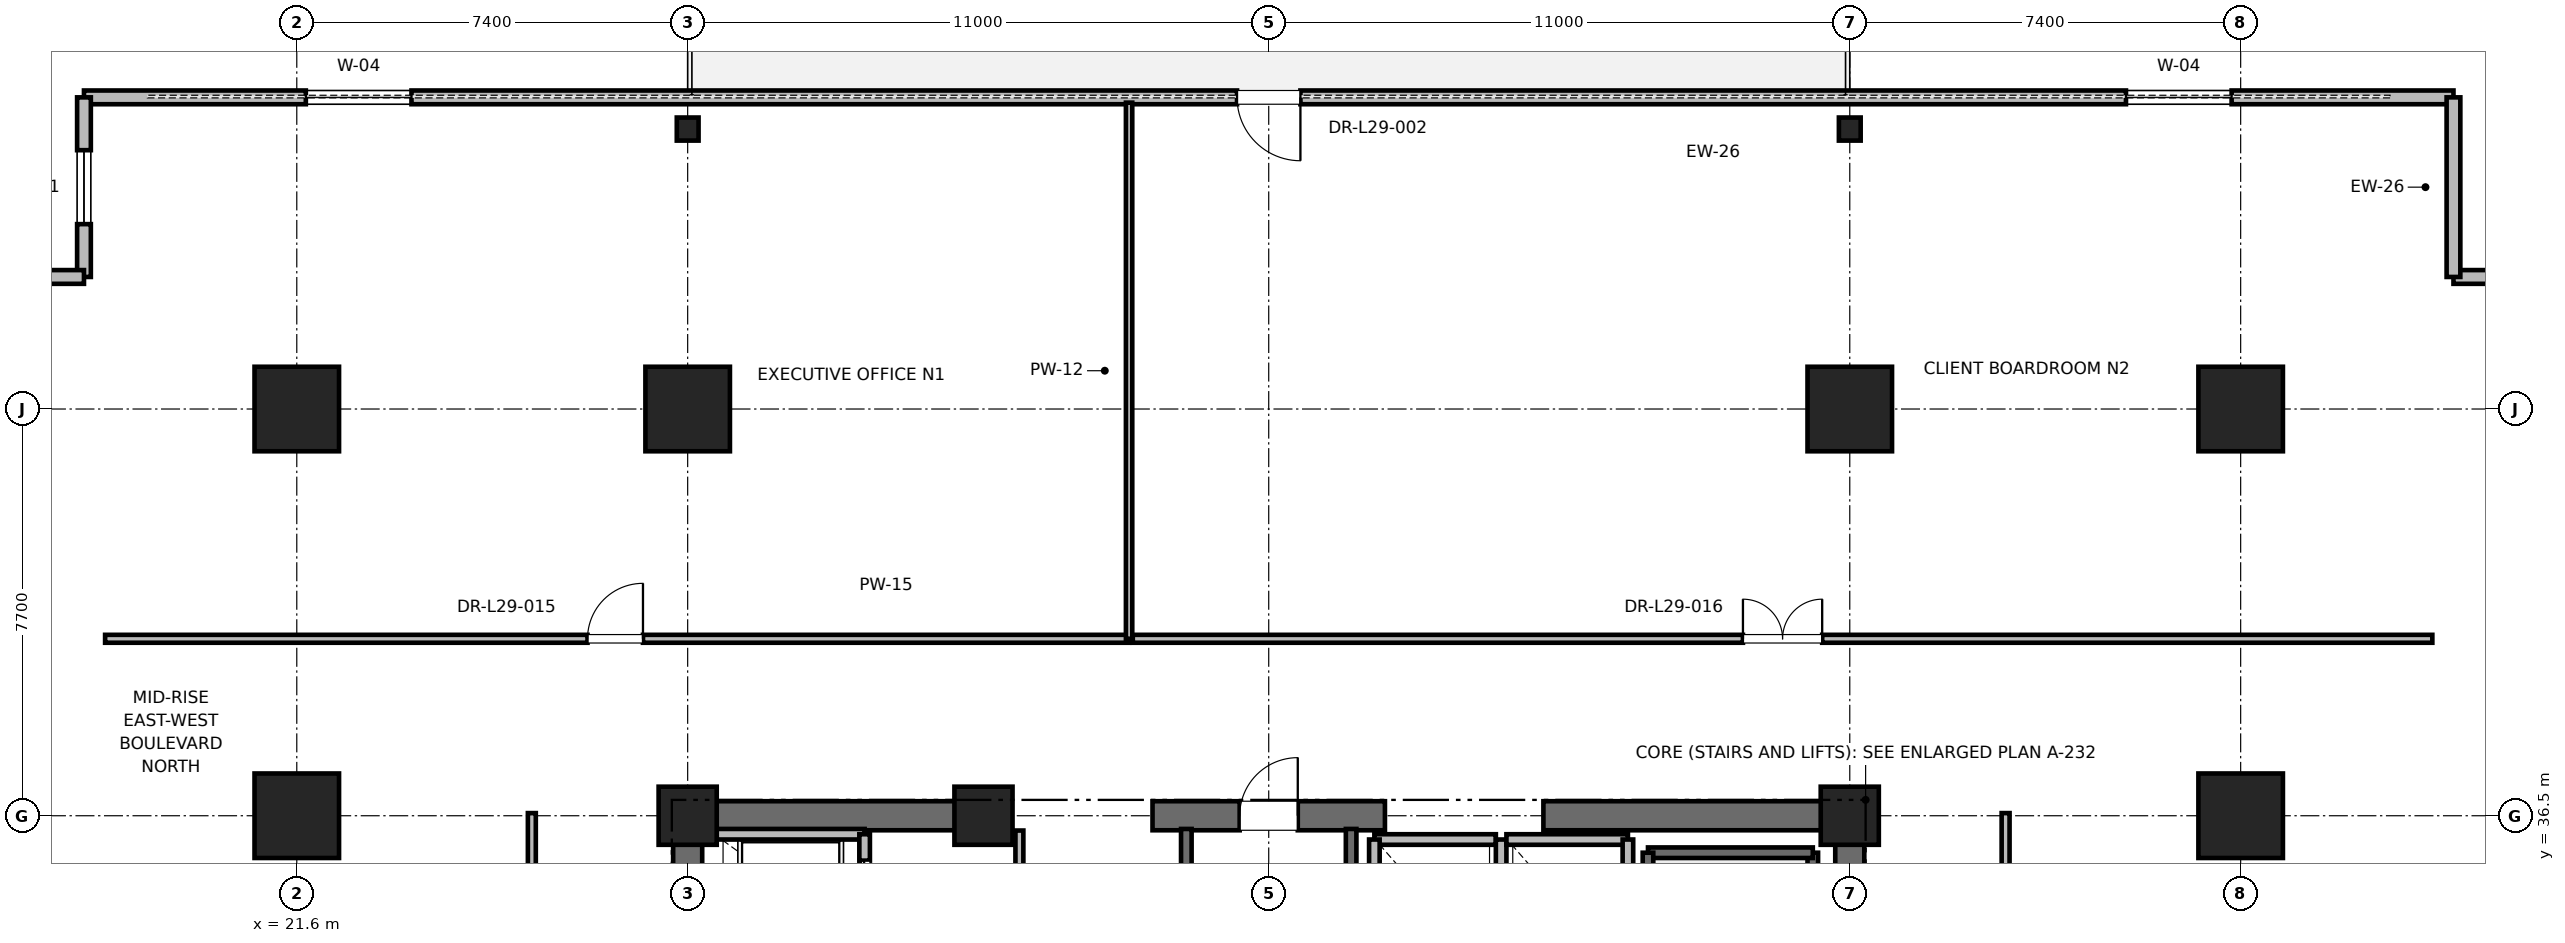
"""IFC4 building model, lengths in metres.
Left out: names, types, materials, properties, quantities, classifications, styles, units other than length and angle.
Written with IfcOpenShell. Run it as: python <this file> out.ifc"""

import sys

from ifc_helpers import new_model, si_unit, direction, frame, frame_2d, origin, origin_2d, place, context, subcontext, project, spatial, rectangle, i_section, extrude, element, fill, save


model = new_model("IFC4")
c1 = context("Model", 3, precision=1e-05, world=origin(), true_north=direction((0.0, 1.0)))
c2 = subcontext(c1, "Body", "Model", "MODEL_VIEW")
j1 = project(units=[si_unit("LENGTHUNIT", "METRE"), si_unit("PLANEANGLEUNIT", "RADIAN")], contexts=[c1])
p1 = place(None, origin())
s1 = spatial("IfcSite", under=j1, at=p1, CompositionType="ELEMENT")
p2 = place(p1, origin())
s2 = spatial("IfcBuilding", under=s1, at=p2, CompositionType="ELEMENT")
p3 = place(p2, frame((0.0, 0.0, 128.4)))
s3 = spatial("IfcBuildingStorey", under=s2, at=p3, CompositionType="ELEMENT", Elevation=128.4)
for number, where, z_axis, x_axis in (
    (1, (29.0, 44.2, 0.0), (0.0, 0.0, 1.0), (1.0, 0.0, 0.0)),
    (2, (51.0, 44.2, 0.0), (0.0, 0.0, 1.0), (1.0, 0.0, 0.0)),
    (3, (21.6, 36.5, 0.0), (0.0, 0.0, 1.0), (1.0, 0.0, 0.0)),
    (4, (58.4, 36.5, 0.0), (0.0, 0.0, 1.0), (1.0, 0.0, 0.0)),
    (5, (21.6, 44.2, 0.0), (0.0, 0.0, 1.0), (1.0, 0.0, 0.0)),
    (6, (58.4, 44.2, 0.0), (0.0, 0.0, 1.0), (1.0, 0.0, 0.0)),
):
    element("IfcColumn", number, at=place(p3, frame(where, z_axis=z_axis, x_axis=x_axis)), inside=s3, PredefinedType="COLUMN", context=c2, shape_type="SweptSolid", body=[
        extrude(rectangle(XDim=1.6, YDim=1.6, at=origin_2d()), origin(), (0.0, 0.0, 1.0), 4.0),
    ])
for number, where, z_axis, x_axis in (
    (7, (29.0, 49.5, 0.0), (0.0, 0.0, 1.0), (1.0, 0.0, 0.0)),
    (8, (51.0, 49.5, 0.0), (0.0, 0.0, 1.0), (1.0, 0.0, 0.0)),
):
    element("IfcColumn", number, at=place(p3, frame(where, z_axis=z_axis, x_axis=x_axis)), inside=s3, PredefinedType="COLUMN", context=c2, shape_type="SweptSolid", body=[
        extrude(i_section(OverallWidth=0.412, OverallDepth=0.437, WebThickness=0.036, FlangeThickness=0.058, FilletRadius=0.015, at=origin_2d()), origin(), (0.0, 0.0, 1.0), 4.0),
    ])
for number, where, z_axis, x_axis in (
    (9, (29.0, 36.5, 0.0), (0.0, 0.0, 1.0), (1.0, 0.0, 0.0)),
    (10, (51.0, 36.5, 0.0), (0.0, 0.0, 1.0), (1.0, 0.0, 0.0)),
    (11, (34.6, 36.5, 0.0), (0.0, 0.0, 1.0), (1.0, 0.0, 0.0)),
):
    element("IfcColumn", number, at=place(p3, frame(where, z_axis=z_axis, x_axis=x_axis)), inside=s3, PredefinedType="PILASTER", context=c2, shape_type="SweptSolid", body=[
        extrude(rectangle(XDim=1.1, YDim=1.1, at=origin_2d()), origin(), (0.0, 0.0, 1.0), 4.0),
    ])
p4 = place(p3, frame((29.0, 36.5, 0.0), z_axis=(0.0, 0.0, 1.0), x_axis=(1.0, 0.0, 0.0)))
e12 = element("IfcWall", 12, at=p4, inside=s3, PredefinedType="SHEAR", context=c2, shape_type="SweptSolid", body=[
    extrude(rectangle(XDim=5.8, YDim=0.55, at=frame_2d((2.9, 0.0))), origin(), (0.0, 0.0, 1.0), 3.775),
])
p5 = place(p3, frame((37.8, 36.5, 0.0), z_axis=(0.0, 0.0, 1.0), x_axis=(1.0, 0.0, 0.0)))
e13 = element("IfcWall", 13, at=p5, inside=s3, PredefinedType="SHEAR", context=c2, shape_type="SweptSolid", body=[
    extrude(rectangle(XDim=4.4, YDim=0.55, at=frame_2d((2.2, 0.0))), origin(), (0.0, 0.0, 1.0), 3.775),
])
p6 = place(p5, frame((1.65, 0.0, 0.0)))
e14 = element("IfcOpeningElement", 14, at=p6, cuts=e13, PredefinedType="OPENING", context=c2, shape_type="SweptSolid", body=[
    extrude(rectangle(XDim=1.1, YDim=2.15, at=frame_2d((0.55, 1.075))), frame((0.0, 0.275, 0.0), z_axis=(0.0, -1.0, 0.0), x_axis=(1.0, 0.0, 0.0)), (0.0, 0.0, 1.0), 0.55),
])
for number, where, z_axis, x_axis in (
    (15, (45.2, 36.5, 0.0), (0.0, 0.0, 1.0), (1.0, 0.0, 0.0)),
    (16, (29.0, 30.7, 0.0), (0.0, 0.0, 1.0), (0.0, 1.0, 0.0)),
):
    element("IfcWall", number, at=place(p3, frame(where, z_axis=z_axis, x_axis=x_axis)), inside=s3, PredefinedType="SHEAR", context=c2, shape_type="SweptSolid", body=[
        extrude(rectangle(XDim=5.8, YDim=0.55, at=frame_2d((2.9, 0.0))), origin(), (0.0, 0.0, 1.0), 3.775),
    ])
p7 = place(p3, frame((51.0, 27.7, 0.0), z_axis=(0.0, 0.0, 1.0), x_axis=(0.0, 1.0, 0.0)))
e17 = element("IfcWall", 17, at=p7, inside=s3, PredefinedType="SHEAR", context=c2, shape_type="SweptSolid", body=[
    extrude(rectangle(XDim=8.8, YDim=0.55, at=frame_2d((4.4, 0.0))), origin(), (0.0, 0.0, 1.0), 3.775),
])
p8 = place(p3, frame((62.429, 50.1, 0.0), z_axis=(0.0, 0.0, 1.0), x_axis=(-1.0, 0.0, 0.0)))
e18 = element("IfcWall", 18, at=p8, inside=s3, PredefinedType="PARAPET", context=c2, shape_type="SweptSolid", body=[
    extrude(rectangle(XDim=44.857, YDim=0.26, at=frame_2d((22.429, 0.0))), origin(), (0.0, 0.0, 1.0), 3.273),
])
p9 = place(p8, frame((4.2, 0.0, 0.85)))
e19 = element("IfcOpeningElement", 19, at=p9, cuts=e18, PredefinedType="OPENING", context=c2, shape_type="SweptSolid", body=[
    extrude(rectangle(XDim=2.0, YDim=2.3, at=frame_2d((1.0, 1.15))), frame((0.0, 0.13, 0.0), z_axis=(0.0, -1.0, 0.0), x_axis=(1.0, 0.0, 0.0)), (0.0, 0.0, 1.0), 0.26),
])
p10 = place(p8, frame((21.829, 0.0, 0.0)))
e20 = element("IfcOpeningElement", 20, at=p10, cuts=e18, PredefinedType="OPENING", context=c2, shape_type="SweptSolid", body=[
    extrude(rectangle(XDim=1.2, YDim=2.2, at=frame_2d((0.6, 1.1))), frame((0.0, 0.13, 0.0), z_axis=(0.0, -1.0, 0.0), x_axis=(1.0, 0.0, 0.0)), (0.0, 0.0, 1.0), 0.26),
])
p11 = place(p8, frame((38.657, 0.0, 0.85)))
e21 = element("IfcOpeningElement", 21, at=p11, cuts=e18, PredefinedType="OPENING", context=c2, shape_type="SweptSolid", body=[
    extrude(rectangle(XDim=2.0, YDim=2.3, at=frame_2d((1.0, 1.15))), frame((0.0, 0.13, 0.0), z_axis=(0.0, -1.0, 0.0), x_axis=(1.0, 0.0, 0.0)), (0.0, 0.0, 1.0), 0.26),
])
p12 = place(p3, frame((66.229, 46.7, 0.0), z_axis=(0.0, 0.0, 1.0), x_axis=(-1.0, 0.0, 0.0)))
e22 = element("IfcWall", 22, at=p12, inside=s3, PredefinedType="PARAPET", context=c2, shape_type="SweptSolid", body=[
    extrude(rectangle(XDim=3.8, YDim=0.26, at=frame_2d((1.9, 0.0))), origin(), (0.0, 0.0, 1.0), 3.775),
])
p13 = place(p12, frame((1.2, 0.0, 0.85)))
e23 = element("IfcOpeningElement", 23, at=p13, cuts=e22, PredefinedType="OPENING", context=c2, shape_type="SweptSolid", body=[
    extrude(rectangle(XDim=1.4, YDim=2.0, at=frame_2d((0.7, 1.0))), frame((0.0, 0.13, 0.0), z_axis=(0.0, -1.0, 0.0), x_axis=(1.0, 0.0, 0.0)), (0.0, 0.0, 1.0), 0.26),
])
p14 = place(p3, frame((62.429, 46.7, 0.0), z_axis=(0.0, 0.0, 1.0), x_axis=(0.0, 1.0, 0.0)))
e24 = element("IfcWall", 24, at=p14, inside=s3, PredefinedType="PARAPET", context=c2, shape_type="SweptSolid", body=[
    extrude(rectangle(XDim=3.4, YDim=0.26, at=frame_2d((1.7, 0.0))), origin(), (0.0, 0.0, 1.0), 3.775),
])
p15 = place(p3, frame((17.571, 50.1, 0.0), z_axis=(0.0, 0.0, 1.0), x_axis=(0.0, -1.0, 0.0)))
e25 = element("IfcWall", 25, at=p15, inside=s3, PredefinedType="PARAPET", context=c2, shape_type="SweptSolid", body=[
    extrude(rectangle(XDim=3.4, YDim=0.26, at=frame_2d((1.7, 0.0))), origin(), (0.0, 0.0, 1.0), 3.775),
])
p16 = place(p15, frame((1.0, 0.0, 0.85)))
e26 = element("IfcOpeningElement", 26, at=p16, cuts=e25, PredefinedType="OPENING", context=c2, shape_type="SweptSolid", body=[
    extrude(rectangle(XDim=1.4, YDim=2.0, at=frame_2d((0.7, 1.0))), frame((0.0, 0.13, 0.0), z_axis=(0.0, -1.0, 0.0), x_axis=(1.0, 0.0, 0.0)), (0.0, 0.0, 1.0), 0.26),
])
p17 = place(p3, frame((17.571, 46.7, 0.0), z_axis=(0.0, 0.0, 1.0), x_axis=(-1.0, 0.0, 0.0)))
e27 = element("IfcWall", 27, at=p17, inside=s3, PredefinedType="PARAPET", context=c2, shape_type="SweptSolid", body=[
    extrude(rectangle(XDim=3.8, YDim=0.26, at=frame_2d((1.9, 0.0))), origin(), (0.0, 0.0, 1.0), 3.775),
])
p18 = place(p3, frame((50.3, 27.65, 0.0), z_axis=(0.0, 0.0, 1.0), x_axis=(0.0, 1.0, 0.0)))
e28 = element("IfcWall", 28, at=p18, inside=s3, PredefinedType="SOLIDWALL", context=c2, shape_type="SweptSolid", body=[
    extrude(rectangle(XDim=8.15, YDim=0.2, at=frame_2d((4.075, 0.0))), origin(), (0.0, 0.0, 1.0), 3.775),
])
p19 = place(p3, frame((47.18, 35.8, 0.0), z_axis=(0.0, 0.0, 1.0), x_axis=(1.0, 0.0, 0.0)))
e29 = element("IfcWall", 29, at=p19, inside=s3, PredefinedType="SOLIDWALL", context=c2, shape_type="SweptSolid", body=[
    extrude(rectangle(XDim=3.12, YDim=0.2, at=frame_2d((1.56, 0.0))), origin(), (0.0, 0.0, 1.0), 3.775),
])
p20 = place(p3, frame((47.18, 27.62, 0.0), z_axis=(0.0, 0.0, 1.0), x_axis=(0.0, 1.0, 0.0)))
e30 = element("IfcWall", 30, at=p20, inside=s3, PredefinedType="SOLIDWALL", context=c2, shape_type="SweptSolid", body=[
    extrude(rectangle(XDim=8.18, YDim=0.2, at=frame_2d((4.09, 0.0))), origin(), (0.0, 0.0, 1.0), 3.775),
])
p21 = place(p3, frame((38.44, 27.38, 0.0), z_axis=(0.0, 0.0, 1.0), x_axis=(0.0, 1.0, 0.0)))
e31 = element("IfcWall", 31, at=p21, inside=s3, PredefinedType="SOLIDWALL", context=c2, shape_type="SweptSolid", body=[
    extrude(rectangle(XDim=8.87, YDim=0.2, at=frame_2d((4.435, 0.0))), origin(), (0.0, 0.0, 1.0), 3.775),
])
p22 = place(p3, frame((41.56, 27.68, 0.0), z_axis=(0.0, 0.0, 1.0), x_axis=(0.0, 1.0, 0.0)))
e32 = element("IfcWall", 32, at=p22, inside=s3, PredefinedType="SOLIDWALL", context=c2, shape_type="SweptSolid", body=[
    extrude(rectangle(XDim=8.57, YDim=0.2, at=frame_2d((4.285, 0.0))), origin(), (0.0, 0.0, 1.0), 3.775),
])
p23 = place(p3, frame((32.35, 36.15, 0.0), z_axis=(0.0, 0.0, 1.0), x_axis=(-1.0, 0.0, 0.0)))
e33 = element("IfcWall", 33, at=p23, inside=s3, PredefinedType="SOLIDWALL", context=c2, shape_type="SweptSolid", body=[
    extrude(rectangle(XDim=2.8, YDim=0.2, at=frame_2d((1.4, 0.0))), origin(), (0.0, 0.0, 1.0), 2.985),
])
p24 = place(p3, frame((32.35, 34.05, 0.0), z_axis=(0.0, 0.0, 1.0), x_axis=(0.0, 1.0, 0.0)))
e34 = element("IfcWall", 34, at=p24, inside=s3, PredefinedType="SOLIDWALL", context=c2, shape_type="SweptSolid", body=[
    extrude(rectangle(XDim=2.1, YDim=0.2, at=frame_2d((1.05, 0.0))), origin(), (0.0, 0.0, 1.0), 3.775),
])
p25 = place(p24, frame((0.5, 0.0, 0.0)))
e35 = element("IfcOpeningElement", 35, at=p25, cuts=e34, PredefinedType="OPENING", context=c2, shape_type="SweptSolid", body=[
    extrude(rectangle(XDim=1.1, YDim=2.2, at=frame_2d((0.55, 1.1))), frame((0.0, 0.1, 0.0), z_axis=(0.0, -1.0, 0.0), x_axis=(1.0, 0.0, 0.0)), (0.0, 0.0, 1.0), 0.2),
])
p26 = place(p3, frame((44.3, 36.05, 0.0), z_axis=(0.0, 0.0, 1.0), x_axis=(-1.0, 0.0, 0.0)))
e36 = element("IfcWall", 36, at=p26, inside=s3, PredefinedType="SOLIDWALL", context=c2, shape_type="SweptSolid", body=[
    extrude(rectangle(XDim=2.3, YDim=0.2, at=frame_2d((1.15, 0.0))), origin(), (0.0, 0.0, 1.0), 2.755),
])
for number, where, z_axis, x_axis in (
    (37, (42.0, 36.05, 0.0), (0.0, 0.0, 1.0), (0.0, -1.0, 0.0)),
    (38, (44.4, 33.45, 0.0), (0.0, 0.0, 1.0), (0.0, 1.0, 0.0)),
):
    element("IfcWall", number, at=place(p3, frame(where, z_axis=z_axis, x_axis=x_axis)), inside=s3, PredefinedType="SOLIDWALL", context=c2, shape_type="SweptSolid", body=[
        extrude(rectangle(XDim=2.6, YDim=0.2, at=frame_2d((1.3, 0.0))), origin(), (0.0, 0.0, 1.0), 2.755),
    ])
p27 = place(p3, frame((46.8, 36.05, 0.0), z_axis=(0.0, 0.0, 1.0), x_axis=(-1.0, 0.0, 0.0)))
e39 = element("IfcWall", 39, at=p27, inside=s3, PredefinedType="SOLIDWALL", context=c2, shape_type="SweptSolid", body=[
    extrude(rectangle(XDim=2.3, YDim=0.2, at=frame_2d((1.15, 0.0))), origin(), (0.0, 0.0, 1.0), 2.755),
])
p28 = place(p3, frame((46.8, 33.45, 0.0), z_axis=(0.0, 0.0, 1.0), x_axis=(0.0, 1.0, 0.0)))
e40 = element("IfcWall", 40, at=p28, inside=s3, PredefinedType="SOLIDWALL", context=c2, shape_type="SweptSolid", body=[
    extrude(rectangle(XDim=2.6, YDim=0.2, at=frame_2d((1.3, 0.0))), origin(), (0.0, 0.0, 1.0), 3.775),
])
p29 = place(p3, frame((35.28, 33.95, 0.0), z_axis=(0.0, 0.0, 1.0), x_axis=(0.0, 1.0, 0.0)))
e41 = element("IfcWall", 41, at=p29, inside=s3, PredefinedType="PARTITIONING", context=c2, shape_type="SweptSolid", body=[
    extrude(rectangle(XDim=2.27, YDim=0.15, at=frame_2d((1.135, 0.0))), origin(), (0.0, 0.0, 1.0), 2.755),
])
p30 = place(p29, frame((0.66, 0.0, 0.0)))
e42 = element("IfcOpeningElement", 42, at=p30, cuts=e41, PredefinedType="OPENING", context=c2, shape_type="SweptSolid", body=[
    extrude(rectangle(XDim=0.95, YDim=2.15, at=frame_2d((0.475, 1.075))), frame((0.0, 0.075, 0.0), z_axis=(0.0, -1.0, 0.0), x_axis=(1.0, 0.0, 0.0)), (0.0, 0.0, 1.0), 0.15),
])
p31 = place(p3, frame((17.971, 39.85, 0.0), z_axis=(0.0, 0.0, 1.0), x_axis=(1.0, 0.0, 0.0)))
e43 = element("IfcWall", 43, at=p31, inside=s3, PredefinedType="PARTITIONING", context=c2, shape_type="SweptSolid", body=[
    extrude(rectangle(XDim=19.385, YDim=0.15, at=frame_2d((9.693, 0.0))), origin(), (0.0, 0.0, 1.0), 2.85),
])
p32 = place(p31, frame((9.133, 0.0, 0.0)))
e44 = element("IfcOpeningElement", 44, at=p32, cuts=e43, PredefinedType="OPENING", context=c2, shape_type="SweptSolid", body=[
    extrude(rectangle(XDim=1.05, YDim=2.2, at=frame_2d((0.525, 1.1))), frame((0.0, 0.075, 0.0), z_axis=(0.0, -1.0, 0.0), x_axis=(1.0, 0.0, 0.0)), (0.0, 0.0, 1.0), 0.15),
])
p33 = place(p3, frame((37.357, 39.85, 0.0), z_axis=(0.0, 0.0, 1.0), x_axis=(0.0, 1.0, 0.0)))
e45 = element("IfcWall", 45, at=p33, inside=s3, PredefinedType="PARTITIONING", context=c2, shape_type="SweptSolid", body=[
    extrude(rectangle(XDim=10.15, YDim=0.12, at=frame_2d((5.075, 0.0))), origin(), (0.0, 0.0, 1.0), 2.405),
])
p34 = place(p3, frame((37.427, 39.85, 0.0), z_axis=(0.0, 0.0, 1.0), x_axis=(1.0, 0.0, 0.0)))
e46 = element("IfcWall", 46, at=p34, inside=s3, PredefinedType="PARTITIONING", context=c2, shape_type="SweptSolid", body=[
    extrude(rectangle(XDim=24.602, YDim=0.15, at=frame_2d((12.301, 0.0))), origin(), (0.0, 0.0, 1.0), 2.85),
])
p35 = place(p34, frame((11.551, 0.0, 0.0)))
e47 = element("IfcOpeningElement", 47, at=p35, cuts=e46, PredefinedType="OPENING", context=c2, shape_type="SweptSolid", body=[
    extrude(rectangle(XDim=1.5, YDim=2.25, at=frame_2d((0.75, 1.125))), frame((0.0, 0.075, 0.0), z_axis=(0.0, -1.0, 0.0), x_axis=(1.0, 0.0, 0.0)), (0.0, 0.0, 1.0), 0.15),
])
p36 = place(p3, frame((26.05, 26.122, 0.0), z_axis=(0.0, 0.0, 1.0), x_axis=(0.0, 1.0, 0.0)))
e48 = element("IfcWall", 48, at=p36, inside=s3, PredefinedType="PARTITIONING", context=c2, shape_type="SweptSolid", body=[
    extrude(rectangle(XDim=10.428, YDim=0.15, at=frame_2d((5.214, 0.0))), origin(), (0.0, 0.0, 1.0), 2.85),
])
p37 = place(p36, frame((4.639, 0.0, 0.0)))
e49 = element("IfcOpeningElement", 49, at=p37, cuts=e48, PredefinedType="OPENING", context=c2, shape_type="SweptSolid", body=[
    extrude(rectangle(XDim=1.0, YDim=2.15, at=frame_2d((0.5, 1.075))), frame((0.0, 0.075, 0.0), z_axis=(0.0, -1.0, 0.0), x_axis=(1.0, 0.0, 0.0)), (0.0, 0.0, 1.0), 0.15),
])
p38 = place(p3, frame((53.95, 18.45, 0.0), z_axis=(0.0, 0.0, 1.0), x_axis=(0.0, 1.0, 0.0)))
e50 = element("IfcWall", 50, at=p38, inside=s3, PredefinedType="PARTITIONING", context=c2, shape_type="SweptSolid", body=[
    extrude(rectangle(XDim=18.1, YDim=0.15, at=frame_2d((9.05, 0.0))), origin(), (0.0, 0.0, 1.0), 2.85),
])
p39 = place(p38, frame((8.55, 0.0, 0.0)))
e51 = element("IfcOpeningElement", 51, at=p39, cuts=e50, PredefinedType="OPENING", context=c2, shape_type="SweptSolid", body=[
    extrude(rectangle(XDim=1.0, YDim=2.15, at=frame_2d((0.5, 1.075))), frame((0.0, 0.075, 0.0), z_axis=(0.0, -1.0, 0.0), x_axis=(1.0, 0.0, 0.0)), (0.0, 0.0, 1.0), 0.15),
])
p40 = place(p9, origin())
e52 = element("IfcWindow", 52, at=p40, inside=s3, PartitioningType="SINGLE_PANEL", PredefinedType="WINDOW", context=c2, shape_type="SweptSolid", body=[
    extrude(rectangle(XDim=2.0, YDim=2.3, at=frame_2d((1.0, 1.15))), frame((0.0, 0.03, 0.0), z_axis=(0.0, -1.0, 0.0), x_axis=(1.0, 0.0, 0.0)), (0.0, 0.0, 1.0), 0.06),
])
fill(e19, e52)
p41 = place(p10, origin())
e53 = element("IfcDoor", 53, at=p41, inside=s3, OperationType="SINGLE_SWING_LEFT", PredefinedType="DOOR", context=c2, shape_type="SweptSolid", body=[
    extrude(rectangle(XDim=1.2, YDim=2.2, at=frame_2d((0.6, 1.1))), frame((0.0, 0.025, 0.0), z_axis=(0.0, -1.0, 0.0), x_axis=(1.0, 0.0, 0.0)), (0.0, 0.0, 1.0), 0.05),
])
fill(e20, e53)
p42 = place(p11, origin())
e54 = element("IfcWindow", 54, at=p42, inside=s3, PartitioningType="SINGLE_PANEL", PredefinedType="WINDOW", context=c2, shape_type="SweptSolid", body=[
    extrude(rectangle(XDim=2.0, YDim=2.3, at=frame_2d((1.0, 1.15))), frame((0.0, 0.03, 0.0), z_axis=(0.0, -1.0, 0.0), x_axis=(1.0, 0.0, 0.0)), (0.0, 0.0, 1.0), 0.06),
])
fill(e21, e54)
p43 = place(p16, origin())
e55 = element("IfcWindow", 55, at=p43, inside=s3, PartitioningType="SINGLE_PANEL", PredefinedType="WINDOW", context=c2, shape_type="SweptSolid", body=[
    extrude(rectangle(XDim=1.4, YDim=2.0, at=frame_2d((0.7, 1.0))), frame((0.0, 0.03, 0.0), z_axis=(0.0, -1.0, 0.0), x_axis=(1.0, 0.0, 0.0)), (0.0, 0.0, 1.0), 0.06),
])
fill(e26, e55)
p44 = place(p6, origin())
e56 = element("IfcDoor", 56, at=p44, inside=s3, OperationType="SINGLE_SWING_RIGHT", PredefinedType="DOOR", context=c2, shape_type="SweptSolid", body=[
    extrude(rectangle(XDim=1.1, YDim=2.15, at=frame_2d((0.55, 1.075))), frame((0.0, 0.025, 0.0), z_axis=(0.0, -1.0, 0.0), x_axis=(1.0, 0.0, 0.0)), (0.0, 0.0, 1.0), 0.05),
])
fill(e14, e56)
p45 = place(p25, origin())
e57 = element("IfcDoor", 57, at=p45, inside=s3, OperationType="SLIDING_TO_RIGHT", PredefinedType="DOOR", context=c2, shape_type="SweptSolid", body=[
    extrude(rectangle(XDim=1.1, YDim=2.2, at=frame_2d((0.55, 1.1))), frame((0.0, 0.025, 0.0), z_axis=(0.0, -1.0, 0.0), x_axis=(1.0, 0.0, 0.0)), (0.0, 0.0, 1.0), 0.05),
])
fill(e35, e57)
p46 = place(p32, origin())
e58 = element("IfcDoor", 58, at=p46, inside=s3, OperationType="SINGLE_SWING_RIGHT", PredefinedType="DOOR", context=c2, shape_type="SweptSolid", body=[
    extrude(rectangle(XDim=1.05, YDim=2.2, at=frame_2d((0.525, 1.1))), frame((0.0, 0.025, 0.0), z_axis=(0.0, -1.0, 0.0), x_axis=(1.0, 0.0, 0.0)), (0.0, 0.0, 1.0), 0.05),
])
fill(e44, e58)
p47 = place(p35, origin())
e59 = element("IfcDoor", 59, at=p47, inside=s3, OperationType="DOUBLE_DOOR_SINGLE_SWING", PredefinedType="DOOR", context=c2, shape_type="SweptSolid", body=[
    extrude(rectangle(XDim=1.5, YDim=2.25, at=frame_2d((0.75, 1.125))), frame((0.0, 0.025, 0.0), z_axis=(0.0, -1.0, 0.0), x_axis=(1.0, 0.0, 0.0)), (0.0, 0.0, 1.0), 0.05),
])
fill(e47, e59)
save(model, sys.argv[1])
